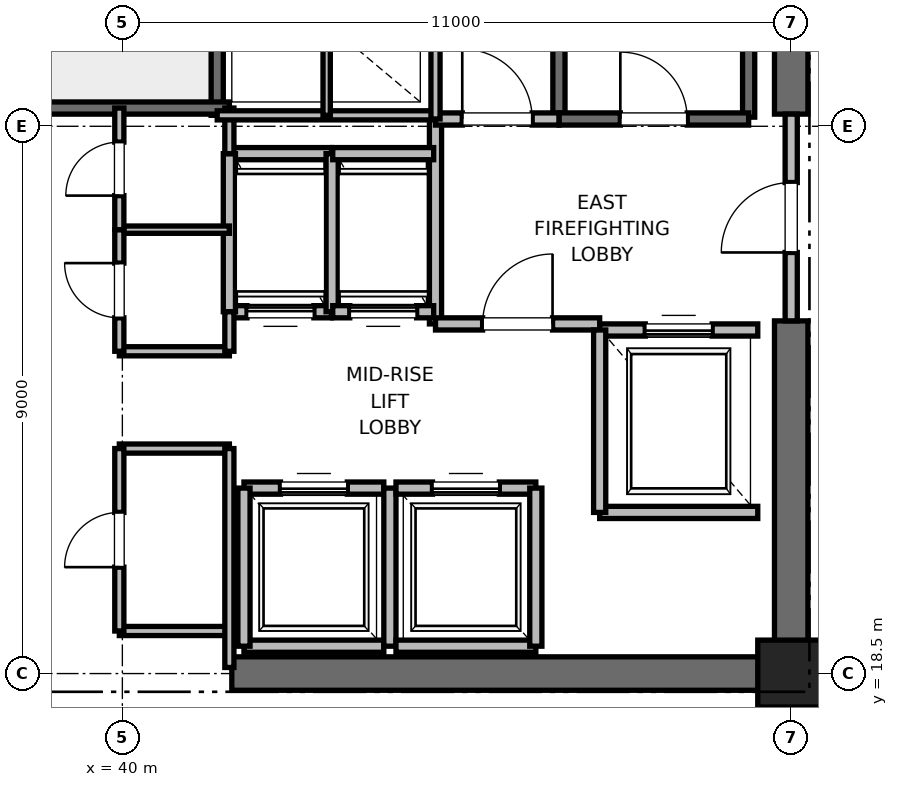
"""IFC4 building model, lengths in metres.
Left out: names, types, materials, properties, quantities, classifications, styles, units other than length and angle.
Written with IfcOpenShell. Run it as: python <this file> out.ifc"""

import sys

from ifc_helpers import new_model, si_unit, direction, frame, frame_2d, origin, origin_2d, place, context, subcontext, project, spatial, rectangle, extrude, element, fill, save


model = new_model("IFC4")
c1 = context("Model", 3, precision=1e-05, world=origin(), true_north=direction((0.0, 1.0)))
c2 = subcontext(c1, "Body", "Model", "MODEL_VIEW")
j1 = project(units=[si_unit("LENGTHUNIT", "METRE"), si_unit("PLANEANGLEUNIT", "RADIAN")], contexts=[c1])
p1 = place(None, origin())
s1 = spatial("IfcSite", under=j1, at=p1, CompositionType="ELEMENT")
p2 = place(p1, origin())
s2 = spatial("IfcBuilding", under=s1, at=p2, CompositionType="ELEMENT")
p3 = place(p2, frame((0.0, 0.0, 144.4)))
s3 = spatial("IfcBuildingStorey", under=s2, at=p3, CompositionType="ELEMENT", Elevation=144.4)
p4 = place(p3, frame((51.0, 18.5, 0.0), z_axis=(0.0, 0.0, 1.0), x_axis=(1.0, 0.0, 0.0)))
e1 = element("IfcColumn", 1, at=p4, inside=s3, PredefinedType="PILASTER", context=c2, shape_type="SweptSolid", body=[
    extrude(rectangle(XDim=1.1, YDim=1.1, at=origin_2d()), origin(), (0.0, 0.0, 1.0), 4.0),
])
p5 = place(p3, frame((41.8, 18.5, 0.0), z_axis=(0.0, 0.0, 1.0), x_axis=(1.0, 0.0, 0.0)))
e2 = element("IfcWall", 2, at=p5, inside=s3, PredefinedType="SHEAR", context=c2, shape_type="SweptSolid", body=[
    extrude(rectangle(XDim=9.2, YDim=0.55, at=frame_2d((4.6, 0.0))), origin(), (0.0, 0.0, 1.0), 3.775),
])
p6 = place(p3, frame((51.0, 18.5, 0.0), z_axis=(0.0, 0.0, 1.0), x_axis=(0.0, 1.0, 0.0)))
e3 = element("IfcWall", 3, at=p6, inside=s3, PredefinedType="SHEAR", context=c2, shape_type="SweptSolid", body=[
    extrude(rectangle(XDim=5.8, YDim=0.55, at=frame_2d((2.9, 0.0))), origin(), (0.0, 0.0, 1.0), 3.775),
])
p7 = place(p3, frame((51.0, 27.7, 0.0), z_axis=(0.0, 0.0, 1.0), x_axis=(0.0, 1.0, 0.0)))
e4 = element("IfcWall", 4, at=p7, inside=s3, PredefinedType="SHEAR", context=c2, shape_type="SweptSolid", body=[
    extrude(rectangle(XDim=8.8, YDim=0.55, at=frame_2d((4.4, 0.0))), origin(), (0.0, 0.0, 1.0), 3.775),
])
p8 = place(p3, frame((50.3, 27.65, 0.0), z_axis=(0.0, 0.0, 1.0), x_axis=(0.0, 1.0, 0.0)))
e5 = element("IfcWall", 5, at=p8, inside=s3, PredefinedType="SOLIDWALL", context=c2, shape_type="SweptSolid", body=[
    extrude(rectangle(XDim=8.15, YDim=0.2, at=frame_2d((4.075, 0.0))), origin(), (0.0, 0.0, 1.0), 3.775),
])
p9 = place(p3, frame((47.18, 27.62, 0.0), z_axis=(0.0, 0.0, 1.0), x_axis=(0.0, 1.0, 0.0)))
e6 = element("IfcWall", 6, at=p9, inside=s3, PredefinedType="SOLIDWALL", context=c2, shape_type="SweptSolid", body=[
    extrude(rectangle(XDim=8.18, YDim=0.2, at=frame_2d((4.09, 0.0))), origin(), (0.0, 0.0, 1.0), 3.775),
])
p10 = place(p3, frame((47.18, 27.62, 0.0), z_axis=(0.0, 0.0, 1.0), x_axis=(1.0, 0.0, 0.0)))
e7 = element("IfcWall", 7, at=p10, inside=s3, PredefinedType="SOLIDWALL", context=c2, shape_type="SweptSolid", body=[
    extrude(rectangle(XDim=3.12, YDim=0.2, at=frame_2d((1.56, 0.0))), origin(), (0.0, 0.0, 1.0), 3.775),
])
p11 = place(p10, frame((1.01, 0.0, 0.0)))
e8 = element("IfcOpeningElement", 8, at=p11, cuts=e7, PredefinedType="OPENING", context=c2, shape_type="SweptSolid", body=[
    extrude(rectangle(XDim=1.1, YDim=2.15, at=frame_2d((0.55, 1.075))), frame((0.0, 0.1, 0.0), z_axis=(0.0, -1.0, 0.0), x_axis=(1.0, 0.0, 0.0)), (0.0, 0.0, 1.0), 0.2),
])
p12 = place(p3, frame((41.56, 27.68, 0.0), z_axis=(0.0, 0.0, 1.0), x_axis=(0.0, 1.0, 0.0)))
e9 = element("IfcWall", 9, at=p12, inside=s3, PredefinedType="SOLIDWALL", context=c2, shape_type="SweptSolid", body=[
    extrude(rectangle(XDim=8.57, YDim=0.2, at=frame_2d((4.285, 0.0))), origin(), (0.0, 0.0, 1.0), 3.775),
])
p13 = place(p3, frame((38.44, 27.8, 0.0), z_axis=(0.0, 0.0, 1.0), x_axis=(1.0, 0.0, 0.0)))
e10 = element("IfcWall", 10, at=p13, inside=s3, PredefinedType="SOLIDWALL", context=c2, shape_type="SweptSolid", body=[
    extrude(rectangle(XDim=3.32, YDim=0.2, at=frame_2d((1.66, 0.0))), origin(), (0.0, 0.0, 1.0), 3.775),
])
p14 = place(p3, frame((45.15, 24.25, 0.0), z_axis=(0.0, 0.0, 1.0), x_axis=(0.0, 1.0, 0.0)))
e11 = element("IfcWall", 11, at=p14, inside=s3, PredefinedType="PARTITIONING", context=c2, shape_type="SweptSolid", body=[
    extrude(rectangle(XDim=3.37, YDim=0.2, at=frame_2d((1.685, 0.0))), origin(), (0.0, 0.0, 1.0), 3.775),
])
p15 = place(p3, frame((45.15, 24.25, 0.0), z_axis=(0.0, 0.0, 1.0), x_axis=(1.0, 0.0, 0.0)))
e12 = element("IfcWall", 12, at=p15, inside=s3, PredefinedType="PARTITIONING", context=c2, shape_type="SweptSolid", body=[
    extrude(rectangle(XDim=2.7, YDim=0.2, at=frame_2d((1.35, 0.0))), origin(), (0.0, 0.0, 1.0), 3.775),
])
p16 = place(p15, frame((0.775, 0.0, 0.0)))
e13 = element("IfcOpeningElement", 13, at=p16, cuts=e12, PredefinedType="OPENING", context=c2, shape_type="SweptSolid", body=[
    extrude(rectangle(XDim=1.15, YDim=2.2, at=frame_2d((0.575, 1.1))), frame((0.0, 0.1, 0.0), z_axis=(0.0, -1.0, 0.0), x_axis=(1.0, 0.0, 0.0)), (0.0, 0.0, 1.0), 0.2),
])
p17 = place(p3, frame((45.15, 27.62, 0.0), z_axis=(0.0, 0.0, 1.0), x_axis=(1.0, 0.0, 0.0)))
e14 = element("IfcWall", 14, at=p17, inside=s3, PredefinedType="PARTITIONING", context=c2, shape_type="SweptSolid", body=[
    extrude(rectangle(XDim=2.03, YDim=0.2, at=frame_2d((1.015, 0.0))), origin(), (0.0, 0.0, 1.0), 3.775),
])
p18 = place(p17, frame((0.44, 0.0, 0.0)))
e15 = element("IfcOpeningElement", 15, at=p18, cuts=e14, PredefinedType="OPENING", context=c2, shape_type="SweptSolid", body=[
    extrude(rectangle(XDim=1.15, YDim=2.2, at=frame_2d((0.575, 1.1))), frame((0.0, 0.1, 0.0), z_axis=(0.0, -1.0, 0.0), x_axis=(1.0, 0.0, 0.0)), (0.0, 0.0, 1.0), 0.2),
])
p19 = place(p3, frame((51.0, 24.3, 0.0), z_axis=(0.0, 0.0, 1.0), x_axis=(0.0, 1.0, 0.0)))
e16 = element("IfcWall", 16, at=p19, inside=s3, PredefinedType="PARTITIONING", context=c2, shape_type="SweptSolid", body=[
    extrude(rectangle(XDim=3.4, YDim=0.2, at=frame_2d((1.7, 0.0))), origin(), (0.0, 0.0, 1.0), 2.755),
])
p20 = place(p19, frame((1.125, 0.0, 0.0)))
e17 = element("IfcOpeningElement", 17, at=p20, cuts=e16, PredefinedType="OPENING", context=c2, shape_type="SweptSolid", body=[
    extrude(rectangle(XDim=1.15, YDim=2.2, at=frame_2d((0.575, 1.1))), frame((0.0, 0.1, 0.0), z_axis=(0.0, -1.0, 0.0), x_axis=(1.0, 0.0, 0.0)), (0.0, 0.0, 1.0), 0.2),
])
p21 = place(p3, frame((47.85, 21.15, 0.0), z_axis=(0.0, 0.0, 1.0), x_axis=(1.0, 0.0, 0.0)))
e18 = element("IfcWall", 18, at=p21, inside=s3, PredefinedType="SOLIDWALL", context=c2, shape_type="SweptSolid", body=[
    extrude(rectangle(XDim=2.6, YDim=0.2, at=frame_2d((1.3, 0.0))), origin(), (0.0, 0.0, 1.0), 3.775),
])
p22 = place(p3, frame((50.45, 24.15, 0.0), z_axis=(0.0, 0.0, 1.0), x_axis=(-1.0, 0.0, 0.0)))
e19 = element("IfcWall", 19, at=p22, inside=s3, PredefinedType="SOLIDWALL", context=c2, shape_type="SweptSolid", body=[
    extrude(rectangle(XDim=2.6, YDim=0.2, at=frame_2d((1.3, 0.0))), origin(), (0.0, 0.0, 1.0), 2.755),
])
p23 = place(p22, frame((0.75, 0.0, 0.0)))
e20 = element("IfcOpeningElement", 20, at=p23, cuts=e19, PredefinedType="OPENING", context=c2, shape_type="SweptSolid", body=[
    extrude(rectangle(XDim=1.1, YDim=2.2, at=frame_2d((0.55, 1.1))), frame((0.0, 0.1, 0.0), z_axis=(0.0, -1.0, 0.0), x_axis=(1.0, 0.0, 0.0)), (0.0, 0.0, 1.0), 0.2),
])
p24 = place(p3, frame((47.85, 24.15, 0.0), z_axis=(0.0, 0.0, 1.0), x_axis=(0.0, -1.0, 0.0)))
e21 = element("IfcWall", 21, at=p24, inside=s3, PredefinedType="SOLIDWALL", context=c2, shape_type="SweptSolid", body=[
    extrude(rectangle(XDim=3.0, YDim=0.2, at=frame_2d((1.5, 0.0))), origin(), (0.0, 0.0, 1.0), 3.775),
])
p25 = place(p3, frame((42.0, 18.95, 0.0), z_axis=(0.0, 0.0, 1.0), x_axis=(1.0, 0.0, 0.0)))
e22 = element("IfcWall", 22, at=p25, inside=s3, PredefinedType="SOLIDWALL", context=c2, shape_type="SweptSolid", body=[
    extrude(rectangle(XDim=2.3, YDim=0.2, at=frame_2d((1.15, 0.0))), origin(), (0.0, 0.0, 1.0), 2.755),
])
p26 = place(p3, frame((44.3, 21.55, 0.0), z_axis=(0.0, 0.0, 1.0), x_axis=(-1.0, 0.0, 0.0)))
e23 = element("IfcWall", 23, at=p26, inside=s3, PredefinedType="SOLIDWALL", context=c2, shape_type="SweptSolid", body=[
    extrude(rectangle(XDim=2.3, YDim=0.2, at=frame_2d((1.15, 0.0))), origin(), (0.0, 0.0, 1.0), 3.775),
])
p27 = place(p26, frame((0.6, 0.0, 0.0)))
e24 = element("IfcOpeningElement", 24, at=p27, cuts=e23, PredefinedType="OPENING", context=c2, shape_type="SweptSolid", body=[
    extrude(rectangle(XDim=1.1, YDim=2.2, at=frame_2d((0.55, 1.1))), frame((0.0, 0.1, 0.0), z_axis=(0.0, -1.0, 0.0), x_axis=(1.0, 0.0, 0.0)), (0.0, 0.0, 1.0), 0.2),
])
p28 = place(p3, frame((42.0, 21.55, 0.0), z_axis=(0.0, 0.0, 1.0), x_axis=(0.0, -1.0, 0.0)))
e25 = element("IfcWall", 25, at=p28, inside=s3, PredefinedType="SOLIDWALL", context=c2, shape_type="SweptSolid", body=[
    extrude(rectangle(XDim=2.6, YDim=0.2, at=frame_2d((1.3, 0.0))), origin(), (0.0, 0.0, 1.0), 2.755),
])
p29 = place(p3, frame((44.4, 18.95, 0.0), z_axis=(0.0, 0.0, 1.0), x_axis=(0.0, 1.0, 0.0)))
e26 = element("IfcWall", 26, at=p29, inside=s3, PredefinedType="SOLIDWALL", context=c2, shape_type="SweptSolid", body=[
    extrude(rectangle(XDim=2.6, YDim=0.2, at=frame_2d((1.3, 0.0))), origin(), (0.0, 0.0, 1.0), 3.775),
])
p30 = place(p3, frame((44.5, 18.95, 0.0), z_axis=(0.0, 0.0, 1.0), x_axis=(1.0, 0.0, 0.0)))
e27 = element("IfcWall", 27, at=p30, inside=s3, PredefinedType="SOLIDWALL", context=c2, shape_type="SweptSolid", body=[
    extrude(rectangle(XDim=2.3, YDim=0.2, at=frame_2d((1.15, 0.0))), origin(), (0.0, 0.0, 1.0), 3.775),
])
p31 = place(p3, frame((46.8, 21.55, 0.0), z_axis=(0.0, 0.0, 1.0), x_axis=(-1.0, 0.0, 0.0)))
e28 = element("IfcWall", 28, at=p31, inside=s3, PredefinedType="SOLIDWALL", context=c2, shape_type="SweptSolid", body=[
    extrude(rectangle(XDim=2.3, YDim=0.2, at=frame_2d((1.15, 0.0))), origin(), (0.0, 0.0, 1.0), 3.775),
])
p32 = place(p31, frame((0.6, 0.0, 0.0)))
e29 = element("IfcOpeningElement", 29, at=p32, cuts=e28, PredefinedType="OPENING", context=c2, shape_type="SweptSolid", body=[
    extrude(rectangle(XDim=1.1, YDim=2.2, at=frame_2d((0.55, 1.1))), frame((0.0, 0.1, 0.0), z_axis=(0.0, -1.0, 0.0), x_axis=(1.0, 0.0, 0.0)), (0.0, 0.0, 1.0), 0.2),
])
p33 = place(p3, frame((46.8, 18.95, 0.0), z_axis=(0.0, 0.0, 1.0), x_axis=(0.0, 1.0, 0.0)))
e30 = element("IfcWall", 30, at=p33, inside=s3, PredefinedType="SOLIDWALL", context=c2, shape_type="SweptSolid", body=[
    extrude(rectangle(XDim=2.6, YDim=0.2, at=frame_2d((1.3, 0.0))), origin(), (0.0, 0.0, 1.0), 3.775),
])
p34 = place(p3, frame((41.76, 24.45, 0.0), z_axis=(0.0, 0.0, 1.0), x_axis=(1.0, 0.0, 0.0)))
e31 = element("IfcWall", 31, at=p34, inside=s3, PredefinedType="SOLIDWALL", context=c2, shape_type="SweptSolid", body=[
    extrude(rectangle(XDim=1.68, YDim=0.2, at=frame_2d((0.84, 0.0))), origin(), (0.0, 0.0, 1.0), 3.775),
])
p35 = place(p34, frame((0.29, 0.0, 0.0)))
e32 = element("IfcOpeningElement", 32, at=p35, cuts=e31, PredefinedType="OPENING", context=c2, shape_type="SweptSolid", body=[
    extrude(rectangle(XDim=1.1, YDim=2.2, at=frame_2d((0.55, 1.1))), frame((0.0, 0.1, 0.0), z_axis=(0.0, -1.0, 0.0), x_axis=(1.0, 0.0, 0.0)), (0.0, 0.0, 1.0), 0.2),
])
p36 = place(p3, frame((43.44, 27.05, 0.0), z_axis=(0.0, 0.0, 1.0), x_axis=(-1.0, 0.0, 0.0)))
e33 = element("IfcWall", 33, at=p36, inside=s3, PredefinedType="SOLIDWALL", context=c2, shape_type="SweptSolid", body=[
    extrude(rectangle(XDim=1.68, YDim=0.2, at=frame_2d((0.84, 0.0))), origin(), (0.0, 0.0, 1.0), 3.775),
])
for number, where, z_axis, x_axis in (
    (34, (41.76, 27.05, 0.0), (0.0, 0.0, 1.0), (0.0, -1.0, 0.0)),
    (35, (43.45, 24.45, 0.0), (0.0, 0.0, 1.0), (0.0, 1.0, 0.0)),
):
    element("IfcWall", number, at=place(p3, frame(where, z_axis=z_axis, x_axis=x_axis)), inside=s3, PredefinedType="SOLIDWALL", context=c2, shape_type="SweptSolid", body=[
        extrude(rectangle(XDim=2.6, YDim=0.2, at=frame_2d((1.3, 0.0))), origin(), (0.0, 0.0, 1.0), 3.775),
    ])
p37 = place(p3, frame((43.46, 24.45, 0.0), z_axis=(0.0, 0.0, 1.0), x_axis=(1.0, 0.0, 0.0)))
e36 = element("IfcWall", 36, at=p37, inside=s3, PredefinedType="SOLIDWALL", context=c2, shape_type="SweptSolid", body=[
    extrude(rectangle(XDim=1.66, YDim=0.2, at=frame_2d((0.83, 0.0))), origin(), (0.0, 0.0, 1.0), 3.775),
])
p38 = place(p37, frame((0.28, 0.0, 0.0)))
e37 = element("IfcOpeningElement", 37, at=p38, cuts=e36, PredefinedType="OPENING", context=c2, shape_type="SweptSolid", body=[
    extrude(rectangle(XDim=1.1, YDim=2.2, at=frame_2d((0.55, 1.1))), frame((0.0, 0.1, 0.0), z_axis=(0.0, -1.0, 0.0), x_axis=(1.0, 0.0, 0.0)), (0.0, 0.0, 1.0), 0.2),
])
p39 = place(p3, frame((45.12, 27.05, 0.0), z_axis=(0.0, 0.0, 1.0), x_axis=(-1.0, 0.0, 0.0)))
e38 = element("IfcWall", 38, at=p39, inside=s3, PredefinedType="SOLIDWALL", context=c2, shape_type="SweptSolid", body=[
    extrude(rectangle(XDim=1.66, YDim=0.2, at=frame_2d((0.83, 0.0))), origin(), (0.0, 0.0, 1.0), 3.775),
])
for number, where, z_axis, x_axis in (
    (39, (39.95, 19.2, 0.0), (0.0, 0.0, 1.0), (1.0, 0.0, 0.0)),
    (40, (39.95, 22.2, 0.0), (0.0, 0.0, 1.0), (1.0, 0.0, 0.0)),
    (41, (39.95, 23.8, 0.0), (0.0, 0.0, 1.0), (1.0, 0.0, 0.0)),
):
    element("IfcWall", number, at=place(p3, frame(where, z_axis=z_axis, x_axis=x_axis)), inside=s3, PredefinedType="PARTITIONING", context=c2, shape_type="SweptSolid", body=[
        extrude(rectangle(XDim=1.81, YDim=0.15, at=frame_2d((0.905, 0.0))), origin(), (0.0, 0.0, 1.0), 2.85),
    ])
p40 = place(p3, frame((39.95, 25.8, 0.0), z_axis=(0.0, 0.0, 1.0), x_axis=(1.0, 0.0, 0.0)))
e42 = element("IfcWall", 42, at=p40, inside=s3, PredefinedType="PARTITIONING", context=c2, shape_type="SweptSolid", body=[
    extrude(rectangle(XDim=1.81, YDim=0.12, at=frame_2d((0.905, 0.0))), origin(), (0.0, 0.0, 1.0), 2.85),
])
p41 = place(p3, frame((41.76, 18.6, 0.0), z_axis=(0.0, 0.0, 1.0), x_axis=(0.0, 1.0, 0.0)))
e43 = element("IfcWall", 43, at=p41, inside=s3, PredefinedType="PARTITIONING", context=c2, shape_type="SweptSolid", body=[
    extrude(rectangle(XDim=3.6, YDim=0.15, at=frame_2d((1.8, 0.0))), origin(), (0.0, 0.0, 1.0), 2.755),
])
p42 = place(p3, frame((41.76, 23.8, 0.0), z_axis=(0.0, 0.0, 1.0), x_axis=(0.0, 1.0, 0.0)))
e44 = element("IfcWall", 44, at=p42, inside=s3, PredefinedType="PARTITIONING", context=c2, shape_type="SweptSolid", body=[
    extrude(rectangle(XDim=0.65, YDim=0.15, at=frame_2d((0.325, 0.0))), origin(), (0.0, 0.0, 1.0), 2.85),
])
p43 = place(p3, frame((41.76, 27.05, 0.0), z_axis=(0.0, 0.0, 1.0), x_axis=(0.0, 1.0, 0.0)))
e45 = element("IfcWall", 45, at=p43, inside=s3, PredefinedType="PARTITIONING", context=c2, shape_type="SweptSolid", body=[
    extrude(rectangle(XDim=0.75, YDim=0.15, at=frame_2d((0.375, 0.0))), origin(), (0.0, 0.0, 1.0), 2.85),
])
p44 = place(p3, frame((39.95, 19.2, 0.0), z_axis=(0.0, 0.0, 1.0), x_axis=(0.0, 1.0, 0.0)))
e46 = element("IfcWall", 46, at=p44, inside=s3, PredefinedType="PARTITIONING", context=c2, shape_type="SweptSolid", body=[
    extrude(rectangle(XDim=3.0, YDim=0.15, at=frame_2d((1.5, 0.0))), origin(), (0.0, 0.0, 1.0), 2.85),
])
p45 = place(p44, frame((1.05, 0.0, 0.0)))
e47 = element("IfcOpeningElement", 47, at=p45, cuts=e46, PredefinedType="OPENING", context=c2, shape_type="SweptSolid", body=[
    extrude(rectangle(XDim=0.9, YDim=2.1, at=frame_2d((0.45, 1.05))), frame((0.0, 0.075, 0.0), z_axis=(0.0, -1.0, 0.0), x_axis=(1.0, 0.0, 0.0)), (0.0, 0.0, 1.0), 0.15),
])
p46 = place(p3, frame((39.95, 23.8, 0.0), z_axis=(0.0, 0.0, 1.0), x_axis=(0.0, 1.0, 0.0)))
e48 = element("IfcWall", 48, at=p46, inside=s3, PredefinedType="PARTITIONING", context=c2, shape_type="SweptSolid", body=[
    extrude(rectangle(XDim=2.0, YDim=0.15, at=frame_2d((1.0, 0.0))), origin(), (0.0, 0.0, 1.0), 2.85),
])
p47 = place(p46, frame((0.55, 0.0, 0.0)))
e49 = element("IfcOpeningElement", 49, at=p47, cuts=e48, PredefinedType="OPENING", context=c2, shape_type="SweptSolid", body=[
    extrude(rectangle(XDim=0.9, YDim=2.1, at=frame_2d((0.45, 1.05))), frame((0.0, 0.075, 0.0), z_axis=(0.0, -1.0, 0.0), x_axis=(1.0, 0.0, 0.0)), (0.0, 0.0, 1.0), 0.15),
])
p48 = place(p3, frame((39.95, 25.8, 0.0), z_axis=(0.0, 0.0, 1.0), x_axis=(0.0, 1.0, 0.0)))
e50 = element("IfcWall", 50, at=p48, inside=s3, PredefinedType="PARTITIONING", context=c2, shape_type="SweptSolid", body=[
    extrude(rectangle(XDim=2.0, YDim=0.15, at=frame_2d((1.0, 0.0))), origin(), (0.0, 0.0, 1.0), 2.85),
])
p49 = place(p48, frame((0.56, 0.0, 0.0)))
e51 = element("IfcOpeningElement", 51, at=p49, cuts=e50, PredefinedType="OPENING", context=c2, shape_type="SweptSolid", body=[
    extrude(rectangle(XDim=0.88, YDim=2.1, at=frame_2d((0.44, 1.05))), frame((0.0, 0.075, 0.0), z_axis=(0.0, -1.0, 0.0), x_axis=(1.0, 0.0, 0.0)), (0.0, 0.0, 1.0), 0.15),
])
p50 = place(p3, frame((41.56, 27.68, 0.0), z_axis=(0.0, 0.0, 1.0), x_axis=(1.0, 0.0, 0.0)))
e52 = element("IfcWall", 52, at=p50, inside=s3, PredefinedType="PARTITIONING", context=c2, shape_type="SweptSolid", body=[
    extrude(rectangle(XDim=3.59, YDim=0.15, at=frame_2d((1.795, 0.0))), origin(), (0.0, 0.0, 1.0), 2.85),
])
p51 = place(p3, frame((45.15, 27.62, 0.0), z_axis=(0.0, 0.0, 1.0), x_axis=(0.0, 1.0, 0.0)))
e53 = element("IfcWall", 53, at=p51, inside=s3, PredefinedType="PARTITIONING", context=c2, shape_type="SweptSolid", body=[
    extrude(rectangle(XDim=3.1, YDim=0.15, at=frame_2d((1.55, 0.0))), origin(), (0.0, 0.0, 1.0), 2.85),
])
p52 = place(p3, frame((43.36, 27.68, 0.0), z_axis=(0.0, 0.0, 1.0), x_axis=(0.0, 1.0, 0.0)))
e54 = element("IfcWall", 54, at=p52, inside=s3, PredefinedType="PARTITIONING", context=c2, shape_type="SweptSolid", body=[
    extrude(rectangle(XDim=3.04, YDim=0.12, at=frame_2d((1.52, 0.0))), origin(), (0.0, 0.0, 1.0), 2.85),
])
p53 = place(p11, origin())
e55 = element("IfcDoor", 55, at=p53, inside=s3, OperationType="SINGLE_SWING_LEFT", PredefinedType="DOOR", context=c2, shape_type="SweptSolid", body=[
    extrude(rectangle(XDim=1.1, YDim=2.15, at=frame_2d((0.55, 1.075))), frame((0.0, 0.025, 0.0), z_axis=(0.0, -1.0, 0.0), x_axis=(1.0, 0.0, 0.0)), (0.0, 0.0, 1.0), 0.05),
])
fill(e8, e55)
p54 = place(p16, origin())
e56 = element("IfcDoor", 56, at=p54, inside=s3, OperationType="SINGLE_SWING_RIGHT", PredefinedType="DOOR", context=c2, shape_type="SweptSolid", body=[
    extrude(rectangle(XDim=1.15, YDim=2.2, at=frame_2d((0.575, 1.1))), frame((0.0, 0.025, 0.0), z_axis=(0.0, -1.0, 0.0), x_axis=(1.0, 0.0, 0.0)), (0.0, 0.0, 1.0), 0.05),
])
fill(e13, e56)
p55 = place(p18, origin())
e57 = element("IfcDoor", 57, at=p55, inside=s3, OperationType="SINGLE_SWING_LEFT", PredefinedType="DOOR", context=c2, shape_type="SweptSolid", body=[
    extrude(rectangle(XDim=1.15, YDim=2.2, at=frame_2d((0.575, 1.1))), frame((0.0, 0.025, 0.0), z_axis=(0.0, -1.0, 0.0), x_axis=(1.0, 0.0, 0.0)), (0.0, 0.0, 1.0), 0.05),
])
fill(e15, e57)
p56 = place(p20, origin())
e58 = element("IfcDoor", 58, at=p56, inside=s3, OperationType="SINGLE_SWING_LEFT", PredefinedType="DOOR", context=c2, shape_type="SweptSolid", body=[
    extrude(rectangle(XDim=1.15, YDim=2.2, at=frame_2d((0.575, 1.1))), frame((0.0, 0.025, 0.0), z_axis=(0.0, -1.0, 0.0), x_axis=(1.0, 0.0, 0.0)), (0.0, 0.0, 1.0), 0.05),
])
fill(e17, e58)
p57 = place(p23, origin())
e59 = element("IfcDoor", 59, at=p57, inside=s3, OperationType="SLIDING_TO_RIGHT", PredefinedType="DOOR", context=c2, shape_type="SweptSolid", body=[
    extrude(rectangle(XDim=1.1, YDim=2.2, at=frame_2d((0.55, 1.1))), frame((0.0, 0.025, 0.0), z_axis=(0.0, -1.0, 0.0), x_axis=(1.0, 0.0, 0.0)), (0.0, 0.0, 1.0), 0.05),
])
fill(e20, e59)
p58 = place(p27, origin())
e60 = element("IfcDoor", 60, at=p58, inside=s3, OperationType="SLIDING_TO_RIGHT", PredefinedType="DOOR", context=c2, shape_type="SweptSolid", body=[
    extrude(rectangle(XDim=1.1, YDim=2.2, at=frame_2d((0.55, 1.1))), frame((0.0, 0.025, 0.0), z_axis=(0.0, -1.0, 0.0), x_axis=(1.0, 0.0, 0.0)), (0.0, 0.0, 1.0), 0.05),
])
fill(e24, e60)
p59 = place(p32, origin())
e61 = element("IfcDoor", 61, at=p59, inside=s3, OperationType="SLIDING_TO_RIGHT", PredefinedType="DOOR", context=c2, shape_type="SweptSolid", body=[
    extrude(rectangle(XDim=1.1, YDim=2.2, at=frame_2d((0.55, 1.1))), frame((0.0, 0.025, 0.0), z_axis=(0.0, -1.0, 0.0), x_axis=(1.0, 0.0, 0.0)), (0.0, 0.0, 1.0), 0.05),
])
fill(e29, e61)
p60 = place(p35, origin())
e62 = element("IfcDoor", 62, at=p60, inside=s3, OperationType="SLIDING_TO_RIGHT", PredefinedType="DOOR", context=c2, shape_type="SweptSolid", body=[
    extrude(rectangle(XDim=1.1, YDim=2.2, at=frame_2d((0.55, 1.1))), frame((0.0, 0.025, 0.0), z_axis=(0.0, -1.0, 0.0), x_axis=(1.0, 0.0, 0.0)), (0.0, 0.0, 1.0), 0.05),
])
fill(e32, e62)
p61 = place(p38, origin())
e63 = element("IfcDoor", 63, at=p61, inside=s3, OperationType="SLIDING_TO_RIGHT", PredefinedType="DOOR", context=c2, shape_type="SweptSolid", body=[
    extrude(rectangle(XDim=1.1, YDim=2.2, at=frame_2d((0.55, 1.1))), frame((0.0, 0.025, 0.0), z_axis=(0.0, -1.0, 0.0), x_axis=(1.0, 0.0, 0.0)), (0.0, 0.0, 1.0), 0.05),
])
fill(e37, e63)
p62 = place(p45, origin())
e64 = element("IfcDoor", 64, at=p62, inside=s3, OperationType="SINGLE_SWING_LEFT", PredefinedType="DOOR", context=c2, shape_type="SweptSolid", body=[
    extrude(rectangle(XDim=0.9, YDim=2.1, at=frame_2d((0.45, 1.05))), frame((0.0, 0.025, 0.0), z_axis=(0.0, -1.0, 0.0), x_axis=(1.0, 0.0, 0.0)), (0.0, 0.0, 1.0), 0.05),
])
fill(e47, e64)
p63 = place(p47, origin())
e65 = element("IfcDoor", 65, at=p63, inside=s3, OperationType="SINGLE_SWING_RIGHT", PredefinedType="DOOR", context=c2, shape_type="SweptSolid", body=[
    extrude(rectangle(XDim=0.9, YDim=2.1, at=frame_2d((0.45, 1.05))), frame((0.0, 0.025, 0.0), z_axis=(0.0, -1.0, 0.0), x_axis=(1.0, 0.0, 0.0)), (0.0, 0.0, 1.0), 0.05),
])
fill(e49, e65)
p64 = place(p49, origin())
e66 = element("IfcDoor", 66, at=p64, inside=s3, OperationType="SINGLE_SWING_LEFT", PredefinedType="DOOR", context=c2, shape_type="SweptSolid", body=[
    extrude(rectangle(XDim=0.88, YDim=2.1, at=frame_2d((0.44, 1.05))), frame((0.0, 0.025, 0.0), z_axis=(0.0, -1.0, 0.0), x_axis=(1.0, 0.0, 0.0)), (0.0, 0.0, 1.0), 0.05),
])
fill(e51, e66)
save(model, sys.argv[1])
